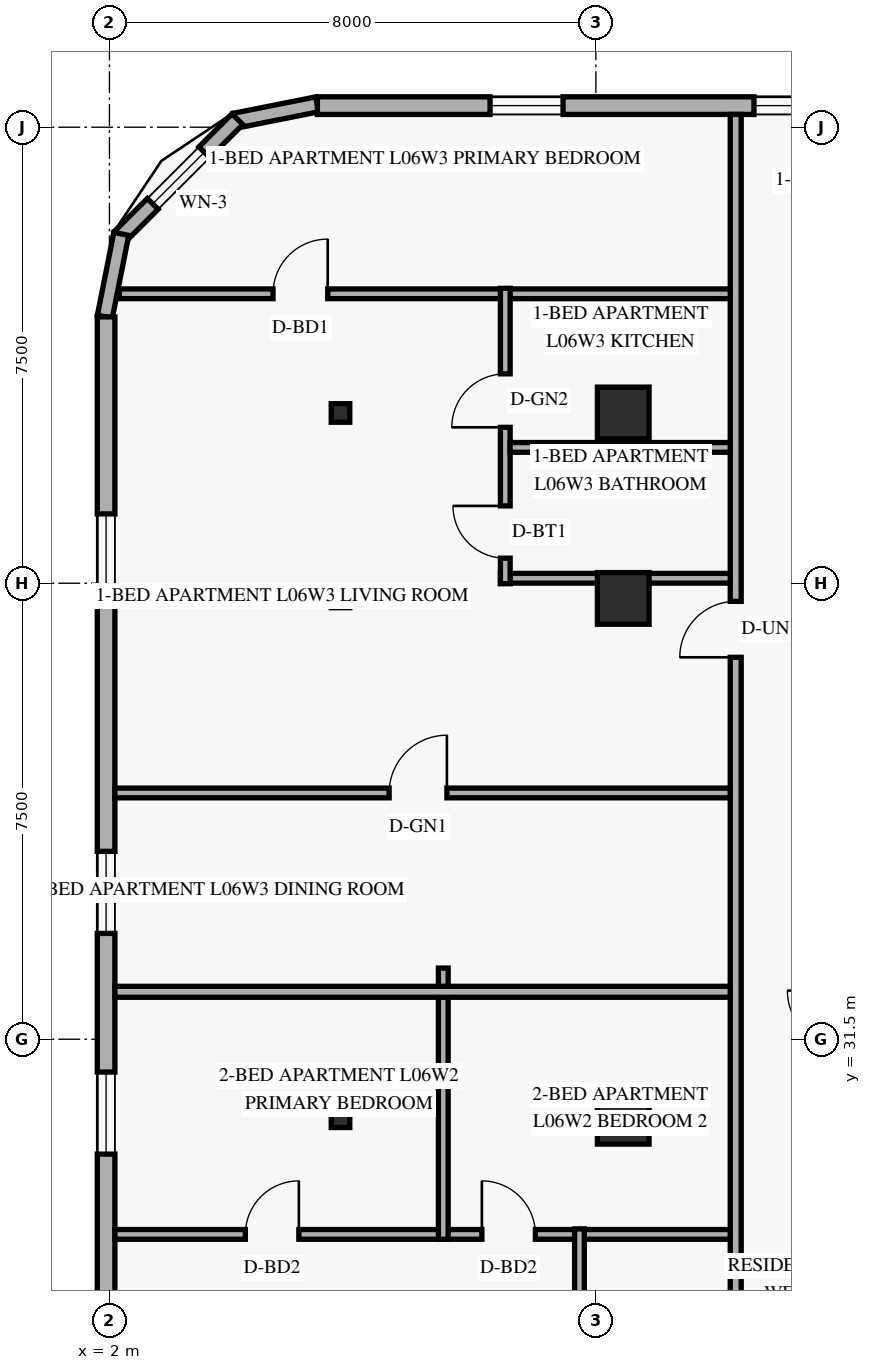
"""IFC4 building model, lengths in metres.
Left out: names, types, materials, properties, quantities, classifications, styles, units other than length and angle.
Written with IfcOpenShell. Run it as: python <this file> out.ifc"""

import sys

from ifc_helpers import new_model, si_unit, direction, frame, frame_2d, origin, origin_2d, place, context, subcontext, project, spatial, rectangle, hollow_rectangle, extrude, element, fill, save


model = new_model("IFC4")
c1 = context("Model", 3, precision=1e-05, world=origin(), true_north=direction((0.0, 1.0)))
c2 = subcontext(c1, "Body", "Model", "MODEL_VIEW")
j1 = project(units=[si_unit("LENGTHUNIT", "METRE"), si_unit("PLANEANGLEUNIT", "RADIAN")], contexts=[c1])
p1 = place(None, origin())
s1 = spatial("IfcSite", under=j1, at=p1, CompositionType="ELEMENT")
p2 = place(p1, origin())
s2 = spatial("IfcBuilding", under=s1, at=p2, CompositionType="ELEMENT")
p3 = place(p2, frame((0.0, 0.0, 27.6)))
s3 = spatial("IfcBuildingStorey", under=s2, at=p3, CompositionType="ELEMENT", Elevation=27.6)
for number, where, z_axis, x_axis in (
    (1, (5.8, 30.2, 0.0), (0.0, 0.0, 1.0), (1.0, 0.0, 0.0)),
    (2, (5.8, 38.75, 0.0), (0.0, 0.0, 1.0), (1.0, 0.0, 0.0)),
    (3, (5.8, 41.8, 0.0), (0.0, 0.0, 1.0), (1.0, 0.0, 0.0)),
):
    element("IfcColumn", number, at=place(p3, frame(where, z_axis=z_axis, x_axis=x_axis)), inside=s3, PredefinedType="COLUMN", context=c2, shape_type="SweptSolid", body=[
        extrude(hollow_rectangle(XDim=0.305, YDim=0.305, WallThickness=0.013, at=origin_2d()), origin(), (0.0, 0.0, 1.0), 3.6),
    ])
for number, where, z_axis, x_axis in (
    (4, (10.45, 30.2, 0.0), (0.0, 0.0, 1.0), (1.0, 0.0, 0.0)),
    (5, (10.45, 38.75, 0.0), (0.0, 0.0, 1.0), (1.0, 0.0, 0.0)),
    (6, (10.45, 41.8, 0.0), (0.0, 0.0, 1.0), (1.0, 0.0, 0.0)),
):
    element("IfcColumn", number, at=place(p3, frame(where, z_axis=z_axis, x_axis=x_axis)), inside=s3, PredefinedType="COLUMN", context=c2, shape_type="SweptSolid", body=[
        extrude(rectangle(XDim=0.85, YDim=0.85, at=origin_2d()), origin(), (0.0, 0.0, 1.0), 3.6),
    ])
p4 = place(p3, frame((5.417, 46.876, 0.0), z_axis=(0.0, 0.0, 1.0), x_axis=(-0.980809899341, -0.19496651342, 0.0)))
e7 = element("IfcWall", 7, at=p4, inside=s3, PredefinedType="SOLIDWALL", context=c2, shape_type="SweptSolid", body=[
    extrude(rectangle(XDim=1.389, YDim=0.25, at=frame_2d((0.694, 0.0))), origin(), (0.0, 0.0, 1.0), 3.36),
])
p5 = place(p3, frame((4.105, 46.632, 0.0), z_axis=(0.0, 0.0, 1.0), x_axis=(-0.707106781187, -0.707106781187, 0.0)))
e8 = element("IfcWall", 8, at=p5, inside=s3, PredefinedType="SOLIDWALL", context=c2, shape_type="SweptSolid", body=[
    extrude(rectangle(XDim=2.739, YDim=0.25, at=frame_2d((1.37, 0.0))), origin(), (0.0, 0.0, 1.0), 3.36),
])
p6 = place(p5, frame((0.77, 0.0, 0.85)))
e9 = element("IfcOpeningElement", 9, at=p6, cuts=e8, PredefinedType="OPENING", context=c2, shape_type="SweptSolid", body=[
    extrude(rectangle(XDim=1.2, YDim=1.5, at=frame_2d((0.6, 0.75))), frame((0.0, 0.135, 0.0), z_axis=(0.0, -1.0, 0.0), x_axis=(1.0, 0.0, 0.0)), (0.0, 0.0, 1.0), 0.27),
])
p7 = place(p3, frame((2.195, 44.746, 0.0), z_axis=(0.0, 0.0, 1.0), x_axis=(-0.19496651342, -0.980809899341, 0.0)))
e10 = element("IfcWall", 10, at=p7, inside=s3, PredefinedType="SOLIDWALL", context=c2, shape_type="SweptSolid", body=[
    extrude(rectangle(XDim=1.389, YDim=0.25, at=frame_2d((0.694, 0.0))), origin(), (0.0, 0.0, 1.0), 3.36),
])
p8 = place(p3, frame((44.98, 46.855, 0.0), z_axis=(0.0, 0.0, 1.0), x_axis=(-1.0, 0.0, 0.0)))
e11 = element("IfcWall", 11, at=p8, inside=s3, PredefinedType="SOLIDWALL", context=c2, shape_type="SweptSolid", body=[
    extrude(rectangle(XDim=39.56, YDim=0.29, at=frame_2d((19.78, 0.0))), origin(), (0.0, 0.0, 1.0), 3.36),
])
p9 = place(p8, frame((35.52, 0.0, 0.85)))
e12 = element("IfcOpeningElement", 12, at=p9, cuts=e11, PredefinedType="OPENING", context=c2, shape_type="SweptSolid", body=[
    extrude(rectangle(XDim=1.2, YDim=1.5, at=frame_2d((0.6, 0.75))), frame((0.0, 0.155, 0.0), z_axis=(0.0, -1.0, 0.0), x_axis=(1.0, 0.0, 0.0)), (0.0, 0.0, 1.0), 0.31),
])
p10 = place(p8, frame((31.18, 0.0, 0.85)))
e13 = element("IfcOpeningElement", 13, at=p10, cuts=e11, PredefinedType="OPENING", context=c2, shape_type="SweptSolid", body=[
    extrude(rectangle(XDim=1.2, YDim=1.5, at=frame_2d((0.6, 0.75))), frame((0.0, 0.155, 0.0), z_axis=(0.0, -1.0, 0.0), x_axis=(1.0, 0.0, 0.0)), (0.0, 0.0, 1.0), 0.31),
])
p11 = place(p8, frame((26.925, 0.0, 0.85)))
e14 = element("IfcOpeningElement", 14, at=p11, cuts=e11, PredefinedType="OPENING", context=c2, shape_type="SweptSolid", body=[
    extrude(rectangle(XDim=1.2, YDim=1.5, at=frame_2d((0.6, 0.75))), frame((0.0, 0.155, 0.0), z_axis=(0.0, -1.0, 0.0), x_axis=(1.0, 0.0, 0.0)), (0.0, 0.0, 1.0), 0.31),
])
p12 = place(p8, frame((21.5, 0.0, 0.85)))
e15 = element("IfcOpeningElement", 15, at=p12, cuts=e11, PredefinedType="OPENING", context=c2, shape_type="SweptSolid", body=[
    extrude(rectangle(XDim=1.2, YDim=1.5, at=frame_2d((0.6, 0.75))), frame((0.0, 0.155, 0.0), z_axis=(0.0, -1.0, 0.0), x_axis=(1.0, 0.0, 0.0)), (0.0, 0.0, 1.0), 0.31),
])
p13 = place(p8, frame((16.265, 0.0, 0.85)))
e16 = element("IfcOpeningElement", 16, at=p13, cuts=e11, PredefinedType="OPENING", context=c2, shape_type="SweptSolid", body=[
    extrude(rectangle(XDim=1.2, YDim=1.5, at=frame_2d((0.6, 0.75))), frame((0.0, 0.155, 0.0), z_axis=(0.0, -1.0, 0.0), x_axis=(1.0, 0.0, 0.0)), (0.0, 0.0, 1.0), 0.31),
])
p14 = place(p8, frame((11.03, 0.0, 0.85)))
e17 = element("IfcOpeningElement", 17, at=p14, cuts=e11, PredefinedType="OPENING", context=c2, shape_type="SweptSolid", body=[
    extrude(rectangle(XDim=1.2, YDim=1.5, at=frame_2d((0.6, 0.75))), frame((0.0, 0.155, 0.0), z_axis=(0.0, -1.0, 0.0), x_axis=(1.0, 0.0, 0.0)), (0.0, 0.0, 1.0), 0.31),
])
p15 = place(p8, frame((7.895, 0.0, 0.85)))
e18 = element("IfcOpeningElement", 18, at=p15, cuts=e11, PredefinedType="OPENING", context=c2, shape_type="SweptSolid", body=[
    extrude(rectangle(XDim=1.2, YDim=1.5, at=frame_2d((0.6, 0.75))), frame((0.0, 0.155, 0.0), z_axis=(0.0, -1.0, 0.0), x_axis=(1.0, 0.0, 0.0)), (0.0, 0.0, 1.0), 0.31),
])
p16 = place(p8, frame((3.115, 0.0, 0.85)))
e19 = element("IfcOpeningElement", 19, at=p16, cuts=e11, PredefinedType="OPENING", context=c2, shape_type="SweptSolid", body=[
    extrude(rectangle(XDim=1.2, YDim=1.5, at=frame_2d((0.6, 0.75))), frame((0.0, 0.155, 0.0), z_axis=(0.0, -1.0, 0.0), x_axis=(1.0, 0.0, 0.0)), (0.0, 0.0, 1.0), 0.31),
])
p17 = place(p3, frame((1.945, 43.38, 0.0), z_axis=(0.0, 0.0, 1.0), x_axis=(0.0, -1.0, 0.0)))
e20 = element("IfcWall", 20, at=p17, inside=s3, PredefinedType="SOLIDWALL", context=c2, shape_type="SweptSolid", body=[
    extrude(rectangle(XDim=38.76, YDim=0.29, at=frame_2d((19.38, 0.0))), origin(), (0.0, 0.0, 1.0), 3.36),
])
p18 = place(p17, frame((32.075, 0.0, 0.85)))
e21 = element("IfcOpeningElement", 21, at=p18, cuts=e20, PredefinedType="OPENING", context=c2, shape_type="SweptSolid", body=[
    extrude(rectangle(XDim=1.35, YDim=1.55, at=frame_2d((0.675, 0.775))), frame((0.0, 0.155, 0.0), z_axis=(0.0, -1.0, 0.0), x_axis=(1.0, 0.0, 0.0)), (0.0, 0.0, 1.0), 0.31),
])
p19 = place(p17, frame((24.063, 0.0, 0.85)))
e22 = element("IfcOpeningElement", 22, at=p19, cuts=e20, PredefinedType="OPENING", context=c2, shape_type="SweptSolid", body=[
    extrude(rectangle(XDim=1.35, YDim=1.55, at=frame_2d((0.675, 0.775))), frame((0.0, 0.155, 0.0), z_axis=(0.0, -1.0, 0.0), x_axis=(1.0, 0.0, 0.0)), (0.0, 0.0, 1.0), 0.31),
])
p20 = place(p17, frame((18.238, 0.0, 0.85)))
e23 = element("IfcOpeningElement", 23, at=p20, cuts=e20, PredefinedType="OPENING", context=c2, shape_type="SweptSolid", body=[
    extrude(rectangle(XDim=1.35, YDim=1.55, at=frame_2d((0.675, 0.775))), frame((0.0, 0.155, 0.0), z_axis=(0.0, -1.0, 0.0), x_axis=(1.0, 0.0, 0.0)), (0.0, 0.0, 1.0), 0.31),
])
p21 = place(p17, frame((12.42, 0.0, 0.85)))
e24 = element("IfcOpeningElement", 24, at=p21, cuts=e20, PredefinedType="OPENING", context=c2, shape_type="SweptSolid", body=[
    extrude(rectangle(XDim=1.35, YDim=1.55, at=frame_2d((0.675, 0.775))), frame((0.0, 0.155, 0.0), z_axis=(0.0, -1.0, 0.0), x_axis=(1.0, 0.0, 0.0)), (0.0, 0.0, 1.0), 0.31),
])
p22 = place(p17, frame((8.79, 0.0, 0.85)))
e25 = element("IfcOpeningElement", 25, at=p22, cuts=e20, PredefinedType="OPENING", context=c2, shape_type="SweptSolid", body=[
    extrude(rectangle(XDim=1.35, YDim=1.55, at=frame_2d((0.675, 0.775))), frame((0.0, 0.155, 0.0), z_axis=(0.0, -1.0, 0.0), x_axis=(1.0, 0.0, 0.0)), (0.0, 0.0, 1.0), 0.31),
])
p23 = place(p17, frame((3.24, 0.0, 0.85)))
e26 = element("IfcOpeningElement", 26, at=p23, cuts=e20, PredefinedType="OPENING", context=c2, shape_type="SweptSolid", body=[
    extrude(rectangle(XDim=1.35, YDim=1.55, at=frame_2d((0.675, 0.775))), frame((0.0, 0.155, 0.0), z_axis=(0.0, -1.0, 0.0), x_axis=(1.0, 0.0, 0.0)), (0.0, 0.0, 1.0), 0.31),
])
p24 = place(p3, frame((12.3, 1.29, 0.0), z_axis=(0.0, 0.0, 1.0), x_axis=(0.0, 1.0, 0.0)))
e27 = element("IfcWall", 27, at=p24, inside=s3, PredefinedType="STANDARD", context=c2, shape_type="SweptSolid", body=[
    extrude(rectangle(XDim=45.42, YDim=0.18, at=frame_2d((22.71, 0.0))), origin(), (0.0, 0.0, 1.0), 2.649),
])
p25 = place(p24, frame((9.41, 0.0, 0.0)))
e28 = element("IfcOpeningElement", 28, at=p25, cuts=e27, PredefinedType="OPENING", context=c2, shape_type="SweptSolid", body=[
    extrude(rectangle(XDim=0.92, YDim=2.15, at=frame_2d((0.46, 1.075))), frame((0.0, 0.1, 0.0), z_axis=(0.0, -1.0, 0.0), x_axis=(1.0, 0.0, 0.0)), (0.0, 0.0, 1.0), 0.2),
])
p26 = place(p24, frame((21.05, 0.0, 0.0)))
e29 = element("IfcOpeningElement", 29, at=p26, cuts=e27, PredefinedType="OPENING", context=c2, shape_type="SweptSolid", body=[
    extrude(rectangle(XDim=0.92, YDim=2.15, at=frame_2d((0.46, 1.075))), frame((0.0, 0.1, 0.0), z_axis=(0.0, -1.0, 0.0), x_axis=(1.0, 0.0, 0.0)), (0.0, 0.0, 1.0), 0.2),
])
p27 = place(p24, frame((36.491, 0.0, 0.0)))
e30 = element("IfcOpeningElement", 30, at=p27, cuts=e27, PredefinedType="OPENING", context=c2, shape_type="SweptSolid", body=[
    extrude(rectangle(XDim=0.92, YDim=2.15, at=frame_2d((0.46, 1.075))), frame((0.0, 0.1, 0.0), z_axis=(0.0, -1.0, 0.0), x_axis=(1.0, 0.0, 0.0)), (0.0, 0.0, 1.0), 0.2),
])
p28 = place(p3, frame((2.09, 28.29, 0.0), z_axis=(0.0, 0.0, 1.0), x_axis=(1.0, 0.0, 0.0)))
e31 = element("IfcWall", 31, at=p28, inside=s3, PredefinedType="PARTITIONING", context=c2, shape_type="SweptSolid", body=[
    extrude(rectangle(XDim=10.12, YDim=0.16, at=frame_2d((5.06, 0.0))), origin(), (0.0, 0.0, 1.0), 2.649),
])
p29 = place(p28, frame((2.145, 0.0, 0.0)))
e32 = element("IfcOpeningElement", 32, at=p29, cuts=e31, PredefinedType="OPENING", context=c2, shape_type="SweptSolid", body=[
    extrude(rectangle(XDim=0.88, YDim=2.14, at=frame_2d((0.44, 1.07))), frame((0.0, 0.09, 0.0), z_axis=(0.0, -1.0, 0.0), x_axis=(1.0, 0.0, 0.0)), (0.0, 0.0, 1.0), 0.18),
])
p30 = place(p28, frame((6.035, 0.0, 0.0)))
e33 = element("IfcOpeningElement", 33, at=p30, cuts=e31, PredefinedType="OPENING", context=c2, shape_type="SweptSolid", body=[
    extrude(rectangle(XDim=0.88, YDim=2.14, at=frame_2d((0.44, 1.07))), frame((0.0, 0.09, 0.0), z_axis=(0.0, -1.0, 0.0), x_axis=(1.0, 0.0, 0.0)), (0.0, 0.0, 1.0), 0.18),
])
p31 = place(p3, frame((9.73, 23.55, 0.0), z_axis=(0.0, 0.0, 1.0), x_axis=(0.0, 1.0, 0.0)))
e34 = element("IfcWall", 34, at=p31, inside=s3, PredefinedType="PLUMBINGWALL", context=c2, shape_type="SweptSolid", body=[
    extrude(rectangle(XDim=4.83, YDim=0.16, at=frame_2d((2.415, 0.0))), origin(), (0.0, 0.0, 1.0), 2.932),
])
p32 = place(p31, frame((0.42, 0.0, 0.0)))
e35 = element("IfcOpeningElement", 35, at=p32, cuts=e34, PredefinedType="OPENING", context=c2, shape_type="SweptSolid", body=[
    extrude(rectangle(XDim=0.86, YDim=2.12, at=frame_2d((0.43, 1.06))), frame((0.0, 0.09, 0.0), z_axis=(0.0, -1.0, 0.0), x_axis=(1.0, 0.0, 0.0)), (0.0, 0.0, 1.0), 0.18),
])
p33 = place(p31, frame((2.559, 0.0, 0.0)))
e36 = element("IfcOpeningElement", 36, at=p33, cuts=e34, PredefinedType="OPENING", context=c2, shape_type="SweptSolid", body=[
    extrude(rectangle(XDim=0.88, YDim=2.12, at=frame_2d((0.44, 1.06))), frame((0.0, 0.09, 0.0), z_axis=(0.0, -1.0, 0.0), x_axis=(1.0, 0.0, 0.0)), (0.0, 0.0, 1.0), 0.18),
])
p34 = place(p3, frame((7.49, 28.21, 0.0), z_axis=(0.0, 0.0, 1.0), x_axis=(0.0, 1.0, 0.0)))
e37 = element("IfcWall", 37, at=p34, inside=s3, PredefinedType="PARTITIONING", context=c2, shape_type="SweptSolid", body=[
    extrude(rectangle(XDim=4.46, YDim=0.16, at=frame_2d((2.23, 0.0))), origin(), (0.0, 0.0, 1.0), 2.649),
])
p35 = place(p3, frame((2.09, 32.28, 0.0), z_axis=(0.0, 0.0, 1.0), x_axis=(1.0, 0.0, 0.0)))
e38 = element("IfcWall", 38, at=p35, inside=s3, PredefinedType="PARTITIONING", context=c2, shape_type="SweptSolid", body=[
    extrude(rectangle(XDim=10.12, YDim=0.18, at=frame_2d((5.06, 0.0))), origin(), (0.0, 0.0, 1.0), 2.649),
])
p36 = place(p3, frame((2.162, 43.76, 0.0), z_axis=(0.0, 0.0, 1.0), x_axis=(1.0, 0.0, 0.0)))
e39 = element("IfcWall", 39, at=p36, inside=s3, PredefinedType="PARTITIONING", context=c2, shape_type="SweptSolid", body=[
    extrude(rectangle(XDim=10.048, YDim=0.16, at=frame_2d((5.024, 0.0))), origin(), (0.0, 0.0, 1.0), 3.36),
])
p37 = place(p36, frame((2.528, 0.0, 0.0)))
e40 = element("IfcOpeningElement", 40, at=p37, cuts=e39, PredefinedType="OPENING", context=c2, shape_type="SweptSolid", body=[
    extrude(rectangle(XDim=0.9, YDim=2.14, at=frame_2d((0.45, 1.07))), frame((0.0, 0.09, 0.0), z_axis=(0.0, -1.0, 0.0), x_axis=(1.0, 0.0, 0.0)), (0.0, 0.0, 1.0), 0.18),
])
p38 = place(p3, frame((8.43, 39.082, 0.0), z_axis=(0.0, 0.0, 1.0), x_axis=(1.0, 0.0, 0.0)))
e41 = element("IfcWall", 41, at=p38, inside=s3, PredefinedType="PLUMBINGWALL", context=c2, shape_type="SweptSolid", body=[
    extrude(rectangle(XDim=3.78, YDim=0.16, at=frame_2d((1.89, 0.0))), origin(), (0.0, 0.0, 1.0), 3.36),
])
p39 = place(p3, frame((8.51, 38.991, 0.0), z_axis=(0.0, 0.0, 1.0), x_axis=(0.0, 1.0, 0.0)))
e42 = element("IfcWall", 42, at=p39, inside=s3, PredefinedType="PLUMBINGWALL", context=c2, shape_type="SweptSolid", body=[
    extrude(rectangle(XDim=4.859, YDim=0.16, at=frame_2d((2.429, 0.0))), origin(), (0.0, 0.0, 1.0), 2.809),
])
p40 = place(p39, frame((0.42, 0.0, 0.0)))
e43 = element("IfcOpeningElement", 43, at=p40, cuts=e42, PredefinedType="OPENING", context=c2, shape_type="SweptSolid", body=[
    extrude(rectangle(XDim=0.86, YDim=2.12, at=frame_2d((0.43, 1.06))), frame((0.0, 0.09, 0.0), z_axis=(0.0, -1.0, 0.0), x_axis=(1.0, 0.0, 0.0)), (0.0, 0.0, 1.0), 0.18),
])
p41 = place(p39, frame((2.572, 0.0, 0.0)))
e44 = element("IfcOpeningElement", 44, at=p41, cuts=e42, PredefinedType="OPENING", context=c2, shape_type="SweptSolid", body=[
    extrude(rectangle(XDim=0.88, YDim=2.12, at=frame_2d((0.44, 1.06))), frame((0.0, 0.09, 0.0), z_axis=(0.0, -1.0, 0.0), x_axis=(1.0, 0.0, 0.0)), (0.0, 0.0, 1.0), 0.18),
])
p42 = place(p3, frame((8.59, 41.234, 0.0), z_axis=(0.0, 0.0, 1.0), x_axis=(1.0, 0.0, 0.0)))
e45 = element("IfcWall", 45, at=p42, inside=s3, PredefinedType="PLUMBINGWALL", context=c2, shape_type="SweptSolid", body=[
    extrude(rectangle(XDim=3.62, YDim=0.16, at=frame_2d((1.81, 0.0))), origin(), (0.0, 0.0, 1.0), 2.649),
])
p43 = place(p3, frame((2.09, 35.55, 0.0), z_axis=(0.0, 0.0, 1.0), x_axis=(1.0, 0.0, 0.0)))
e46 = element("IfcWall", 46, at=p43, inside=s3, PredefinedType="PARTITIONING", context=c2, shape_type="SweptSolid", body=[
    extrude(rectangle(XDim=10.12, YDim=0.16, at=frame_2d((5.06, 0.0))), origin(), (0.0, 0.0, 1.0), 2.649),
])
p44 = place(p43, frame((4.51, 0.0, 0.0)))
e47 = element("IfcOpeningElement", 47, at=p44, cuts=e46, PredefinedType="OPENING", context=c2, shape_type="SweptSolid", body=[
    extrude(rectangle(XDim=0.95, YDim=2.15, at=frame_2d((0.475, 1.075))), frame((0.0, 0.09, 0.0), z_axis=(0.0, -1.0, 0.0), x_axis=(1.0, 0.0, 0.0)), (0.0, 0.0, 1.0), 0.18),
])
p45 = place(p6, origin())
e48 = element("IfcWindow", 48, at=p45, inside=s3, PartitioningType="SINGLE_PANEL", PredefinedType="WINDOW", context=c2, shape_type="SweptSolid", body=[
    extrude(rectangle(XDim=1.2, YDim=1.5, at=frame_2d((0.6, 0.75))), frame((0.0, 0.03, 0.0), z_axis=(0.0, -1.0, 0.0), x_axis=(1.0, 0.0, 0.0)), (0.0, 0.0, 1.0), 0.06),
])
fill(e9, e48)
p46 = place(p9, origin())
e49 = element("IfcWindow", 49, at=p46, inside=s3, PartitioningType="SINGLE_PANEL", PredefinedType="WINDOW", context=c2, shape_type="SweptSolid", body=[
    extrude(rectangle(XDim=1.2, YDim=1.5, at=frame_2d((0.6, 0.75))), frame((0.0, 0.03, 0.0), z_axis=(0.0, -1.0, 0.0), x_axis=(1.0, 0.0, 0.0)), (0.0, 0.0, 1.0), 0.06),
])
fill(e12, e49)
p47 = place(p10, origin())
e50 = element("IfcWindow", 50, at=p47, inside=s3, PartitioningType="SINGLE_PANEL", PredefinedType="WINDOW", context=c2, shape_type="SweptSolid", body=[
    extrude(rectangle(XDim=1.2, YDim=1.5, at=frame_2d((0.6, 0.75))), frame((0.0, 0.03, 0.0), z_axis=(0.0, -1.0, 0.0), x_axis=(1.0, 0.0, 0.0)), (0.0, 0.0, 1.0), 0.06),
])
fill(e13, e50)
p48 = place(p21, origin())
e51 = element("IfcWindow", 51, at=p48, inside=s3, PartitioningType="SINGLE_PANEL", PredefinedType="WINDOW", context=c2, shape_type="SweptSolid", body=[
    extrude(rectangle(XDim=1.35, YDim=1.55, at=frame_2d((0.675, 0.775))), frame((0.0, 0.03, 0.0), z_axis=(0.0, -1.0, 0.0), x_axis=(1.0, 0.0, 0.0)), (0.0, 0.0, 1.0), 0.06),
])
fill(e24, e51)
p49 = place(p22, origin())
e52 = element("IfcWindow", 52, at=p49, inside=s3, PartitioningType="SINGLE_PANEL", PredefinedType="WINDOW", context=c2, shape_type="SweptSolid", body=[
    extrude(rectangle(XDim=1.35, YDim=1.55, at=frame_2d((0.675, 0.775))), frame((0.0, 0.03, 0.0), z_axis=(0.0, -1.0, 0.0), x_axis=(1.0, 0.0, 0.0)), (0.0, 0.0, 1.0), 0.06),
])
fill(e25, e52)
p50 = place(p23, origin())
e53 = element("IfcWindow", 53, at=p50, inside=s3, PartitioningType="SINGLE_PANEL", PredefinedType="WINDOW", context=c2, shape_type="SweptSolid", body=[
    extrude(rectangle(XDim=1.35, YDim=1.55, at=frame_2d((0.675, 0.775))), frame((0.0, 0.03, 0.0), z_axis=(0.0, -1.0, 0.0), x_axis=(1.0, 0.0, 0.0)), (0.0, 0.0, 1.0), 0.06),
])
fill(e26, e53)
p51 = place(p29, origin())
e54 = element("IfcDoor", 54, at=p51, inside=s3, OperationType="SINGLE_SWING_RIGHT", PredefinedType="DOOR", context=c2, shape_type="SweptSolid", body=[
    extrude(rectangle(XDim=0.88, YDim=2.14, at=frame_2d((0.44, 1.07))), frame((0.0, 0.025, 0.0), z_axis=(0.0, -1.0, 0.0), x_axis=(1.0, 0.0, 0.0)), (0.0, 0.0, 1.0), 0.05),
])
fill(e32, e54)
p52 = place(p30, origin())
e55 = element("IfcDoor", 55, at=p52, inside=s3, OperationType="SINGLE_SWING_LEFT", PredefinedType="DOOR", context=c2, shape_type="SweptSolid", body=[
    extrude(rectangle(XDim=0.88, YDim=2.14, at=frame_2d((0.44, 1.07))), frame((0.0, 0.025, 0.0), z_axis=(0.0, -1.0, 0.0), x_axis=(1.0, 0.0, 0.0)), (0.0, 0.0, 1.0), 0.05),
])
fill(e33, e55)
p53 = place(p44, origin())
e56 = element("IfcDoor", 56, at=p53, inside=s3, OperationType="SINGLE_SWING_RIGHT", PredefinedType="DOOR", context=c2, shape_type="SweptSolid", body=[
    extrude(rectangle(XDim=0.95, YDim=2.15, at=frame_2d((0.475, 1.075))), frame((0.0, 0.025, 0.0), z_axis=(0.0, -1.0, 0.0), x_axis=(1.0, 0.0, 0.0)), (0.0, 0.0, 1.0), 0.05),
])
fill(e47, e56)
p54 = place(p27, origin())
e57 = element("IfcDoor", 57, at=p54, inside=s3, OperationType="SINGLE_SWING_LEFT", PredefinedType="DOOR", context=c2, shape_type="SweptSolid", body=[
    extrude(rectangle(XDim=0.92, YDim=2.15, at=frame_2d((0.46, 1.075))), frame((0.0, 0.025, 0.0), z_axis=(0.0, -1.0, 0.0), x_axis=(1.0, 0.0, 0.0)), (0.0, 0.0, 1.0), 0.05),
])
fill(e30, e57)
p55 = place(p40, origin())
e58 = element("IfcDoor", 58, at=p55, inside=s3, OperationType="SINGLE_SWING_RIGHT", PredefinedType="DOOR", context=c2, shape_type="SweptSolid", body=[
    extrude(rectangle(XDim=0.86, YDim=2.12, at=frame_2d((0.43, 1.06))), frame((0.0, 0.025, 0.0), z_axis=(0.0, -1.0, 0.0), x_axis=(1.0, 0.0, 0.0)), (0.0, 0.0, 1.0), 0.05),
])
fill(e43, e58)
p56 = place(p41, origin())
e59 = element("IfcDoor", 59, at=p56, inside=s3, OperationType="SINGLE_SWING_LEFT", PredefinedType="DOOR", context=c2, shape_type="SweptSolid", body=[
    extrude(rectangle(XDim=0.88, YDim=2.12, at=frame_2d((0.44, 1.06))), frame((0.0, 0.025, 0.0), z_axis=(0.0, -1.0, 0.0), x_axis=(1.0, 0.0, 0.0)), (0.0, 0.0, 1.0), 0.05),
])
fill(e44, e59)
p57 = place(p37, origin())
e60 = element("IfcDoor", 60, at=p57, inside=s3, OperationType="SINGLE_SWING_RIGHT", PredefinedType="DOOR", context=c2, shape_type="SweptSolid", body=[
    extrude(rectangle(XDim=0.9, YDim=2.14, at=frame_2d((0.45, 1.07))), frame((0.0, 0.025, 0.0), z_axis=(0.0, -1.0, 0.0), x_axis=(1.0, 0.0, 0.0)), (0.0, 0.0, 1.0), 0.05),
])
fill(e40, e60)
save(model, sys.argv[1])
